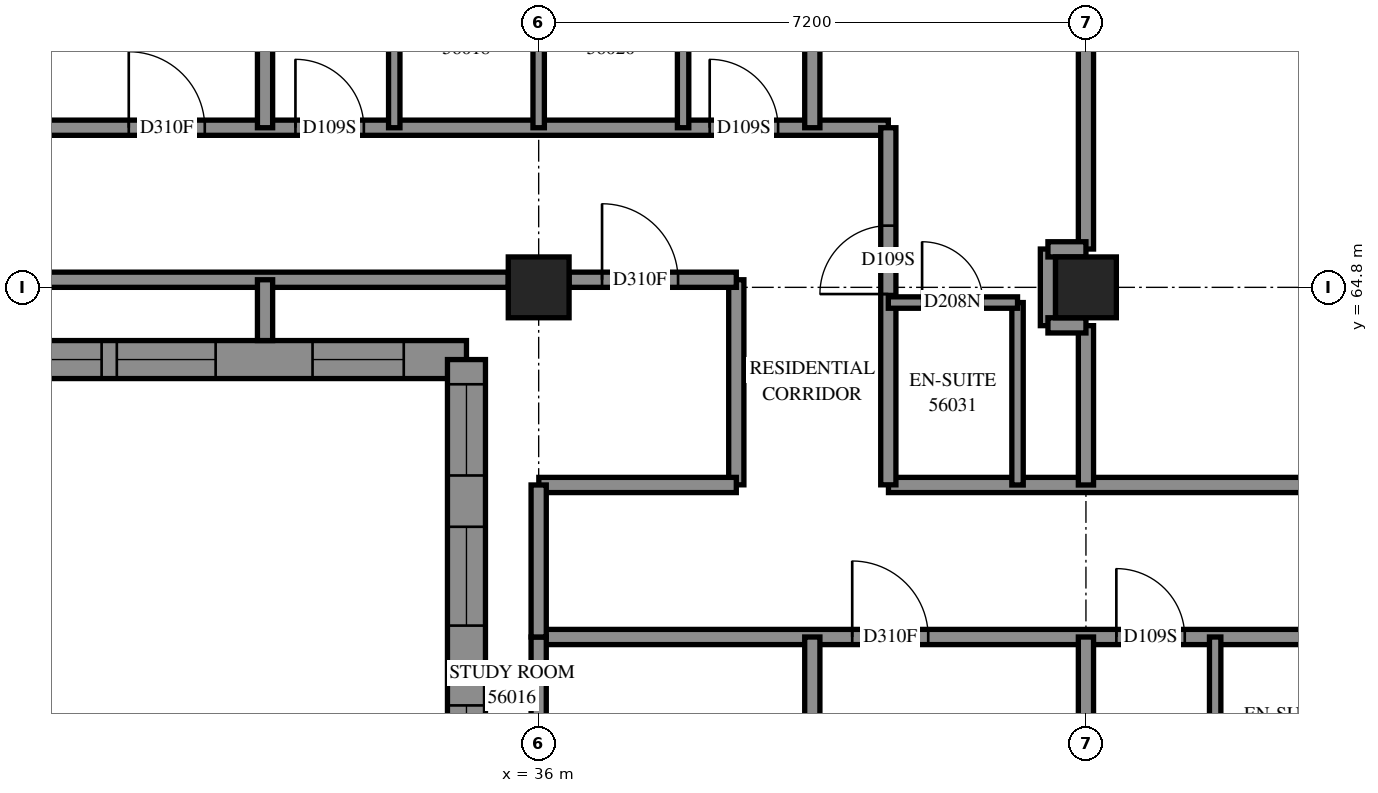
"""IFC4 building model, lengths in metres.
Left out: names, types, materials, properties, quantities, classifications, styles, units other than length and angle.
Written with IfcOpenShell. Run it as: python <this file> out.ifc"""

import sys

from ifc_helpers import new_model, si_unit, direction, frame, frame_2d, origin, origin_2d, place, context, subcontext, project, spatial, polyline, rectangle, outline, extrude, element, fill, save


model = new_model("IFC4")
c1 = context("Model", 3, precision=1e-05, world=origin(), true_north=direction((0.0, 1.0)))
c2 = subcontext(c1, "Body", "Model", "MODEL_VIEW")
j1 = project(units=[si_unit("LENGTHUNIT", "METRE"), si_unit("PLANEANGLEUNIT", "RADIAN")], contexts=[c1])
p1 = place(None, origin())
s1 = spatial("IfcSite", under=j1, at=p1, CompositionType="ELEMENT")
p2 = place(p1, origin())
s2 = spatial("IfcBuilding", under=s1, at=p2, CompositionType="ELEMENT")
p3 = place(p2, frame((0.0, 0.0, 206.6)))
s3 = spatial("IfcBuildingStorey", under=s2, at=p3, CompositionType="ELEMENT", Elevation=206.6)
for number, where, z_axis, x_axis in (
    (1, (36.0, 64.8, 0.0), (0.0, 0.0, 1.0), (1.0, 0.0, 0.0)),
    (2, (43.2, 64.8, 0.0), (0.0, 0.0, 1.0), (1.0, 0.0, 0.0)),
):
    element("IfcColumn", number, at=place(p3, frame(where, z_axis=z_axis, x_axis=x_axis)), inside=s3, PredefinedType="COLUMN", context=c2, shape_type="SweptSolid", body=[
        extrude(rectangle(XDim=0.8, YDim=0.8, at=origin_2d()), origin(), (0.0, 0.0, 1.0), 3.1),
    ])
p4 = place(p3, frame((26.799, 63.85, 0.0), z_axis=(0.0, 0.0, 1.0), x_axis=(1.0, 0.0, 0.0)))
e3 = element("IfcWall", 3, at=p4, inside=s3, PredefinedType="SOLIDWALL", context=c2, shape_type="SweptSolid", body=[
    extrude(outline(polyline([(-0.25, -0.25), (8.001, -0.25), (8.501, 0.25), (0.25, 0.25), (-0.25, -0.25)])), origin(), (0.0, 0.0, 1.0), 3.1),
])
p5 = place(p4, frame((2.151, 0.0, 0.45)))
e4 = element("IfcOpeningElement", 4, at=p5, cuts=e3, PredefinedType="OPENING", context=c2, shape_type="SweptSolid", body=[
    extrude(rectangle(XDim=1.3, YDim=2.5, at=frame_2d((0.65, 1.25))), frame((0.0, 0.26, 0.0), z_axis=(0.0, -1.0, 0.0), x_axis=(1.0, 0.0, 0.0)), (0.0, 0.0, 1.0), 0.52),
])
p6 = place(p4, frame((3.651, 0.0, 0.45)))
e5 = element("IfcOpeningElement", 5, at=p6, cuts=e3, PredefinedType="OPENING", context=c2, shape_type="SweptSolid", body=[
    extrude(rectangle(XDim=1.3, YDim=2.5, at=frame_2d((0.65, 1.25))), frame((0.0, 0.26, 0.0), z_axis=(0.0, -1.0, 0.0), x_axis=(1.0, 0.0, 0.0)), (0.0, 0.0, 1.0), 0.52),
])
p7 = place(p4, frame((0.625, 0.0, 0.45)))
e6 = element("IfcOpeningElement", 6, at=p7, cuts=e3, PredefinedType="OPENING", context=c2, shape_type="SweptSolid", body=[
    extrude(rectangle(XDim=1.2, YDim=2.5, at=frame_2d((0.6, 1.25))), frame((0.0, 0.26, 0.0), z_axis=(0.0, -1.0, 0.0), x_axis=(1.0, 0.0, 0.0)), (0.0, 0.0, 1.0), 0.52),
])
p8 = place(p4, frame((6.226, 0.0, 0.45)))
e7 = element("IfcOpeningElement", 7, at=p8, cuts=e3, PredefinedType="OPENING", context=c2, shape_type="SweptSolid", body=[
    extrude(rectangle(XDim=1.2, YDim=2.5, at=frame_2d((0.6, 1.25))), frame((0.0, 0.26, 0.0), z_axis=(0.0, -1.0, 0.0), x_axis=(1.0, 0.0, 0.0)), (0.0, 0.0, 1.0), 0.52),
])
p9 = place(p3, frame((35.05, 63.85, 0.0), z_axis=(0.0, 0.0, 1.0), x_axis=(0.0, -1.0, 0.0)))
e8 = element("IfcWall", 8, at=p9, inside=s3, PredefinedType="SOLIDWALL", context=c2, shape_type="SweptSolid", body=[
    extrude(outline(polyline([(0.25, -0.25), (7.45, -0.25), (6.95, 0.25), (-0.25, 0.25), (0.25, -0.25)])), origin(), (0.0, 0.0, 1.0), 3.1),
])
p10 = place(p9, frame((2.2, 0.0, 0.45)))
e9 = element("IfcOpeningElement", 9, at=p10, cuts=e8, PredefinedType="OPENING", context=c2, shape_type="SweptSolid", body=[
    extrude(rectangle(XDim=1.3, YDim=2.5, at=frame_2d((0.65, 1.25))), frame((0.0, 0.26, 0.0), z_axis=(0.0, -1.0, 0.0), x_axis=(1.0, 0.0, 0.0)), (0.0, 0.0, 1.0), 0.52),
])
p11 = place(p9, frame((4.55, 0.0, 0.45)))
e10 = element("IfcOpeningElement", 10, at=p11, cuts=e8, PredefinedType="OPENING", context=c2, shape_type="SweptSolid", body=[
    extrude(rectangle(XDim=1.3, YDim=2.5, at=frame_2d((0.65, 1.25))), frame((0.0, 0.26, 0.0), z_axis=(0.0, -1.0, 0.0), x_axis=(1.0, 0.0, 0.0)), (0.0, 0.0, 1.0), 0.52),
])
p12 = place(p9, frame((0.325, 0.0, 0.45)))
e11 = element("IfcOpeningElement", 11, at=p12, cuts=e8, PredefinedType="OPENING", context=c2, shape_type="SweptSolid", body=[
    extrude(rectangle(XDim=1.2, YDim=2.5, at=frame_2d((0.6, 1.25))), frame((0.0, 0.26, 0.0), z_axis=(0.0, -1.0, 0.0), x_axis=(1.0, 0.0, 0.0)), (0.0, 0.0, 1.0), 0.52),
])
p13 = place(p3, frame((36.0, 60.2, 0.0), z_axis=(0.0, 0.0, 1.0), x_axis=(1.0, 0.0, 0.0)))
e12 = element("IfcWall", 12, at=p13, inside=s3, PredefinedType="PARTITIONING", context=c2, shape_type="SweptSolid", body=[
    extrude(rectangle(XDim=17.0, YDim=0.2, at=frame_2d((8.5, 0.0))), origin(), (0.0, 0.0, 1.0), 3.1),
])
p14 = place(p13, frame((4.125, 0.0, 0.0)))
e13 = element("IfcOpeningElement", 13, at=p14, cuts=e12, PredefinedType="OPENING", context=c2, shape_type="SweptSolid", body=[
    extrude(rectangle(XDim=1.0, YDim=2.1, at=frame_2d((0.5, 1.05))), frame((0.0, 0.11, 0.0), z_axis=(0.0, -1.0, 0.0), x_axis=(1.0, 0.0, 0.0)), (0.0, 0.0, 1.0), 0.22),
])
p15 = place(p13, frame((7.6, 0.0, 0.0)))
e14 = element("IfcOpeningElement", 14, at=p15, cuts=e12, PredefinedType="OPENING", context=c2, shape_type="SweptSolid", body=[
    extrude(rectangle(XDim=0.9, YDim=2.1, at=frame_2d((0.45, 1.05))), frame((0.0, 0.11, 0.0), z_axis=(0.0, -1.0, 0.0), x_axis=(1.0, 0.0, 0.0)), (0.0, 0.0, 1.0), 0.22),
])
p16 = place(p13, frame((11.48, 0.0, 0.0)))
e15 = element("IfcOpeningElement", 15, at=p16, cuts=e12, PredefinedType="OPENING", context=c2, shape_type="SweptSolid", body=[
    extrude(rectangle(XDim=1.0, YDim=2.1, at=frame_2d((0.5, 1.05))), frame((0.0, 0.11, 0.0), z_axis=(0.0, -1.0, 0.0), x_axis=(1.0, 0.0, 0.0)), (0.0, 0.0, 1.0), 0.22),
])
p17 = place(p13, frame((15.805, 0.0, 0.0)))
e16 = element("IfcOpeningElement", 16, at=p17, cuts=e12, PredefinedType="OPENING", context=c2, shape_type="SweptSolid", body=[
    extrude(rectangle(XDim=1.0, YDim=2.1, at=frame_2d((0.5, 1.05))), frame((0.0, 0.11, 0.0), z_axis=(0.0, -1.0, 0.0), x_axis=(1.0, 0.0, 0.0)), (0.0, 0.0, 1.0), 0.22),
])
p18 = place(p3, frame((40.602, 62.2, 0.0), z_axis=(0.0, 0.0, 1.0), x_axis=(1.0, 0.0, 0.0)))
e17 = element("IfcWall", 17, at=p18, inside=s3, PredefinedType="PARTITIONING", context=c2, shape_type="SweptSolid", body=[
    extrude(rectangle(XDim=14.998, YDim=0.2, at=frame_2d((7.499, 0.0))), origin(), (0.0, 0.0, 1.0), 3.1),
])
p19 = place(p18, frame((6.308, 0.0, 0.0)))
e18 = element("IfcOpeningElement", 18, at=p19, cuts=e17, PredefinedType="OPENING", context=c2, shape_type="SweptSolid", body=[
    extrude(rectangle(XDim=1.0, YDim=2.1, at=frame_2d((0.5, 1.05))), frame((0.0, 0.11, 0.0), z_axis=(0.0, -1.0, 0.0), x_axis=(1.0, 0.0, 0.0)), (0.0, 0.0, 1.0), 0.22),
])
p20 = place(p18, frame((9.928, 0.0, 0.0)))
e19 = element("IfcOpeningElement", 19, at=p20, cuts=e17, PredefinedType="OPENING", context=c2, shape_type="SweptSolid", body=[
    extrude(rectangle(XDim=0.9, YDim=2.1, at=frame_2d((0.45, 1.05))), frame((0.0, 0.11, 0.0), z_axis=(0.0, -1.0, 0.0), x_axis=(1.0, 0.0, 0.0)), (0.0, 0.0, 1.0), 0.22),
])
p21 = place(p18, frame((13.746, 0.0, 0.0)))
e20 = element("IfcOpeningElement", 20, at=p21, cuts=e17, PredefinedType="OPENING", context=c2, shape_type="SweptSolid", body=[
    extrude(rectangle(XDim=1.0, YDim=2.1, at=frame_2d((0.5, 1.05))), frame((0.0, 0.11, 0.0), z_axis=(0.0, -1.0, 0.0), x_axis=(1.0, 0.0, 0.0)), (0.0, 0.0, 1.0), 0.22),
])
p22 = place(p3, frame((28.802, 66.9, 0.0), z_axis=(0.0, 0.0, 1.0), x_axis=(1.0, 0.0, 0.0)))
e21 = element("IfcWall", 21, at=p22, inside=s3, PredefinedType="PARTITIONING", context=c2, shape_type="SweptSolid", body=[
    extrude(rectangle(XDim=11.798, YDim=0.2, at=frame_2d((5.899, 0.0))), origin(), (0.0, 0.0, 1.0), 3.1),
])
p23 = place(p22, frame((1.805, 0.0, 0.0)))
e22 = element("IfcOpeningElement", 22, at=p23, cuts=e21, PredefinedType="OPENING", context=c2, shape_type="SweptSolid", body=[
    extrude(rectangle(XDim=1.0, YDim=2.1, at=frame_2d((0.5, 1.05))), frame((0.0, 0.11, 0.0), z_axis=(0.0, -1.0, 0.0), x_axis=(1.0, 0.0, 0.0)), (0.0, 0.0, 1.0), 0.22),
])
p24 = place(p22, frame((3.998, 0.0, 0.0)))
e23 = element("IfcOpeningElement", 23, at=p24, cuts=e21, PredefinedType="OPENING", context=c2, shape_type="SweptSolid", body=[
    extrude(rectangle(XDim=0.9, YDim=2.1, at=frame_2d((0.45, 1.05))), frame((0.0, 0.11, 0.0), z_axis=(0.0, -1.0, 0.0), x_axis=(1.0, 0.0, 0.0)), (0.0, 0.0, 1.0), 0.22),
])
p25 = place(p22, frame((9.448, 0.0, 0.0)))
e24 = element("IfcOpeningElement", 24, at=p25, cuts=e21, PredefinedType="OPENING", context=c2, shape_type="SweptSolid", body=[
    extrude(rectangle(XDim=0.9, YDim=2.1, at=frame_2d((0.45, 1.05))), frame((0.0, 0.11, 0.0), z_axis=(0.0, -1.0, 0.0), x_axis=(1.0, 0.0, 0.0)), (0.0, 0.0, 1.0), 0.22),
])
p26 = place(p3, frame((29.2, 64.9, 0.0), z_axis=(0.0, 0.0, 1.0), x_axis=(1.0, 0.0, 0.0)))
e25 = element("IfcWall", 25, at=p26, inside=s3, PredefinedType="PARTITIONING", context=c2, shape_type="SweptSolid", body=[
    extrude(rectangle(XDim=6.4, YDim=0.2, at=frame_2d((3.2, 0.0))), origin(), (0.0, 0.0, 1.0), 2.6),
])
p27 = place(p3, frame((43.2, 65.304, 0.0), z_axis=(0.0, 0.0, 1.0), x_axis=(0.0, 1.0, 0.0)))
e26 = element("IfcWall", 26, at=p27, inside=s3, PredefinedType="PARTITIONING", context=c2, shape_type="SweptSolid", body=[
    extrude(rectangle(XDim=6.192, YDim=0.2, at=frame_2d((3.096, 0.0))), origin(), (0.0, 0.0, 1.0), 3.1),
])
p28 = place(p3, frame((32.4, 66.9, 0.0), z_axis=(0.0, 0.0, 1.0), x_axis=(0.0, 1.0, 0.0)))
e27 = element("IfcWall", 27, at=p28, inside=s3, PredefinedType="PARTITIONING", context=c2, shape_type="SweptSolid", body=[
    extrude(rectangle(XDim=6.035, YDim=0.2, at=frame_2d((3.018, 0.0))), origin(), (0.0, 0.0, 1.0), 3.1),
])
p29 = place(p3, frame((39.6, 66.9, 0.0), z_axis=(0.0, 0.0, 1.0), x_axis=(0.0, 1.0, 0.0)))
e28 = element("IfcWall", 28, at=p29, inside=s3, PredefinedType="PARTITIONING", context=c2, shape_type="SweptSolid", body=[
    extrude(rectangle(XDim=5.981, YDim=0.2, at=frame_2d((2.991, 0.0))), origin(), (0.0, 0.0, 1.0), 3.1),
])
p30 = place(p3, frame((40.6, 62.202, 0.0), z_axis=(0.0, 0.0, 1.0), x_axis=(0.0, 1.0, 0.0)))
e29 = element("IfcWall", 29, at=p30, inside=s3, PredefinedType="PARTITIONING", context=c2, shape_type="SweptSolid", body=[
    extrude(rectangle(XDim=4.698, YDim=0.2, at=frame_2d((2.349, 0.0))), origin(), (0.0, 0.0, 1.0), 3.1),
])
p31 = place(p30, frame((2.51, 0.0, 0.0)))
e30 = element("IfcOpeningElement", 30, at=p31, cuts=e29, PredefinedType="OPENING", context=c2, shape_type="SweptSolid", body=[
    extrude(rectangle(XDim=0.9, YDim=2.1, at=frame_2d((0.45, 1.05))), frame((0.0, 0.11, 0.0), z_axis=(0.0, -1.0, 0.0), x_axis=(1.0, 0.0, 0.0)), (0.0, 0.0, 1.0), 0.22),
])
p32 = place(p3, frame((39.6, 56.9, 0.0), z_axis=(0.0, 0.0, 1.0), x_axis=(0.0, 1.0, 0.0)))
e31 = element("IfcWall", 31, at=p32, inside=s3, PredefinedType="PARTITIONING", context=c2, shape_type="SweptSolid", body=[
    extrude(rectangle(XDim=3.3, YDim=0.2, at=frame_2d((1.65, 0.0))), origin(), (0.0, 0.0, 1.0), 3.1),
])
p33 = place(p3, frame((38.6, 62.202, 0.0), z_axis=(0.0, 0.0, 1.0), x_axis=(0.0, 1.0, 0.0)))
e32 = element("IfcWall", 32, at=p33, inside=s3, PredefinedType="PARTITIONING", context=c2, shape_type="SweptSolid", body=[
    extrude(rectangle(XDim=2.698, YDim=0.2, at=frame_2d((1.349, 0.0))), origin(), (0.0, 0.0, 1.0), 3.1),
])
p34 = place(p3, frame((36.002, 62.2, 0.0), z_axis=(0.0, 0.0, 1.0), x_axis=(1.0, 0.0, 0.0)))
e33 = element("IfcWall", 33, at=p34, inside=s3, PredefinedType="PARTITIONING", context=c2, shape_type="SweptSolid", body=[
    extrude(rectangle(XDim=2.598, YDim=0.2, at=frame_2d((1.299, 0.0))), origin(), (0.0, 0.0, 1.0), 3.1),
])
for number, where, z_axis, x_axis in (
    (34, (44.9, 57.8, 0.0), (0.0, 0.0, 1.0), (0.0, 1.0, 0.0)),
    (35, (34.1, 66.9, 0.0), (0.0, 0.0, 1.0), (0.0, 1.0, 0.0)),
    (36, (36.0, 66.9, 0.0), (0.0, 0.0, 1.0), (0.0, 1.0, 0.0)),
    (37, (37.9, 66.9, 0.0), (0.0, 0.0, 1.0), (0.0, 1.0, 0.0)),
    (38, (42.3, 62.2, 0.0), (0.0, 0.0, 1.0), (0.0, 1.0, 0.0)),
):
    element("IfcWall", number, at=place(p3, frame(where, z_axis=z_axis, x_axis=x_axis)), inside=s3, PredefinedType="PARTITIONING", context=c2, shape_type="SweptSolid", body=[
        extrude(rectangle(XDim=2.4, YDim=0.15, at=frame_2d((1.2, 0.0))), origin(), (0.0, 0.0, 1.0), 3.1),
    ])
p35 = place(p3, frame((36.4, 64.9, 0.0), z_axis=(0.0, 0.0, 1.0), x_axis=(1.0, 0.0, 0.0)))
e39 = element("IfcWall", 39, at=p35, inside=s3, PredefinedType="PARTITIONING", context=c2, shape_type="SweptSolid", body=[
    extrude(rectangle(XDim=2.2, YDim=0.2, at=frame_2d((1.1, 0.0))), origin(), (0.0, 0.0, 1.0), 3.1),
])
p36 = place(p35, frame((0.434, 0.0, 0.0)))
e40 = element("IfcOpeningElement", 40, at=p36, cuts=e39, PredefinedType="OPENING", context=c2, shape_type="SweptSolid", body=[
    extrude(rectangle(XDim=1.0, YDim=2.1, at=frame_2d((0.5, 1.05))), frame((0.0, 0.11, 0.0), z_axis=(0.0, -1.0, 0.0), x_axis=(1.0, 0.0, 0.0)), (0.0, 0.0, 1.0), 0.22),
])
p37 = place(p3, frame((36.0, 58.0, 0.0), z_axis=(0.0, 0.0, 1.0), x_axis=(0.0, 1.0, 0.0)))
e41 = element("IfcWall", 41, at=p37, inside=s3, PredefinedType="PARTITIONING", context=c2, shape_type="SweptSolid", body=[
    extrude(rectangle(XDim=2.2, YDim=0.2, at=frame_2d((1.1, 0.0))), origin(), (0.0, 0.0, 1.0), 2.6),
])
p38 = place(p3, frame((43.2, 58.0, 0.0), z_axis=(0.0, 0.0, 1.0), x_axis=(0.0, 1.0, 0.0)))
e42 = element("IfcWall", 42, at=p38, inside=s3, PredefinedType="PARTITIONING", context=c2, shape_type="SweptSolid", body=[
    extrude(rectangle(XDim=2.2, YDim=0.2, at=frame_2d((1.1, 0.0))), origin(), (0.0, 0.0, 1.0), 3.1),
])
p39 = place(p3, frame((43.2, 62.2, 0.0), z_axis=(0.0, 0.0, 1.0), x_axis=(0.0, 1.0, 0.0)))
e43 = element("IfcWall", 43, at=p39, inside=s3, PredefinedType="PARTITIONING", context=c2, shape_type="SweptSolid", body=[
    extrude(rectangle(XDim=2.096, YDim=0.2, at=frame_2d((1.048, 0.0))), origin(), (0.0, 0.0, 1.0), 3.1),
])
p40 = place(p3, frame((36.0, 60.2, 0.0), z_axis=(0.0, 0.0, 1.0), x_axis=(0.0, 1.0, 0.0)))
e44 = element("IfcWall", 44, at=p40, inside=s3, PredefinedType="PARTITIONING", context=c2, shape_type="SweptSolid", body=[
    extrude(rectangle(XDim=2.0, YDim=0.2, at=frame_2d((1.0, 0.0))), origin(), (0.0, 0.0, 1.0), 2.6),
])
p41 = place(p3, frame((40.6, 64.6, 0.0), z_axis=(0.0, 0.0, 1.0), x_axis=(1.0, 0.0, 0.0)))
e45 = element("IfcWall", 45, at=p41, inside=s3, PredefinedType="PARTITIONING", context=c2, shape_type="SweptSolid", body=[
    extrude(rectangle(XDim=1.7, YDim=0.15, at=frame_2d((0.85, 0.0))), origin(), (0.0, 0.0, 1.0), 3.1),
])
p42 = place(p41, frame((0.444, 0.0, 0.0)))
e46 = element("IfcOpeningElement", 46, at=p42, cuts=e45, PredefinedType="OPENING", context=c2, shape_type="SweptSolid", body=[
    extrude(rectangle(XDim=0.8, YDim=2.1, at=frame_2d((0.4, 1.05))), frame((0.0, 0.085, 0.0), z_axis=(0.0, -1.0, 0.0), x_axis=(1.0, 0.0, 0.0)), (0.0, 0.0, 1.0), 0.17),
])
p43 = place(p3, frame((42.7, 64.296, 0.0), z_axis=(0.0, 0.0, 1.0), x_axis=(0.0, 1.0, 0.0)))
e47 = element("IfcWall", 47, at=p43, inside=s3, PredefinedType="PARTITIONING", context=c2, shape_type="SweptSolid", body=[
    extrude(rectangle(XDim=1.008, YDim=0.2, at=frame_2d((0.504, 0.0))), origin(), (0.0, 0.0, 1.0), 3.1),
])
p44 = place(p3, frame((32.4, 64.1, 0.0), z_axis=(0.0, 0.0, 1.0), x_axis=(0.0, 1.0, 0.0)))
e48 = element("IfcWall", 48, at=p44, inside=s3, PredefinedType="PARTITIONING", context=c2, shape_type="SweptSolid", body=[
    extrude(rectangle(XDim=0.8, YDim=0.2, at=frame_2d((0.4, 0.0))), origin(), (0.0, 0.0, 1.0), 3.1),
])
for number, where, z_axis, x_axis in (
    (49, (42.7, 65.3, 0.0), (0.0, 0.0, 1.0), (1.0, 0.0, 0.0)),
    (50, (42.7, 64.3, 0.0), (0.0, 0.0, 1.0), (1.0, 0.0, 0.0)),
):
    element("IfcWall", number, at=place(p3, frame(where, z_axis=z_axis, x_axis=x_axis)), inside=s3, PredefinedType="PARTITIONING", context=c2, shape_type="SweptSolid", body=[
        extrude(rectangle(XDim=0.5, YDim=0.2, at=frame_2d((0.25, 0.0))), origin(), (0.0, 0.0, 1.0), 3.1),
    ])
p45 = place(p5, origin())
e51 = element("IfcWindow", 51, at=p45, inside=s3, PartitioningType="SINGLE_PANEL", PredefinedType="WINDOW", context=c2, shape_type="SweptSolid", body=[
    extrude(rectangle(XDim=1.3, YDim=2.5, at=frame_2d((0.65, 1.25))), frame((0.0, 0.18, 0.0), z_axis=(0.0, -1.0, 0.0), x_axis=(1.0, 0.0, 0.0)), (0.0, 0.0, 1.0), 0.06),
])
fill(e4, e51)
p46 = place(p6, origin())
e52 = element("IfcWindow", 52, at=p46, inside=s3, PartitioningType="SINGLE_PANEL", PredefinedType="WINDOW", context=c2, shape_type="SweptSolid", body=[
    extrude(rectangle(XDim=1.3, YDim=2.5, at=frame_2d((0.65, 1.25))), frame((0.0, 0.18, 0.0), z_axis=(0.0, -1.0, 0.0), x_axis=(1.0, 0.0, 0.0)), (0.0, 0.0, 1.0), 0.06),
])
fill(e5, e52)
p47 = place(p8, origin())
e53 = element("IfcWindow", 53, at=p47, inside=s3, PartitioningType="SINGLE_PANEL", PredefinedType="WINDOW", context=c2, shape_type="SweptSolid", body=[
    extrude(rectangle(XDim=1.2, YDim=2.5, at=frame_2d((0.6, 1.25))), frame((0.0, 0.18, 0.0), z_axis=(0.0, -1.0, 0.0), x_axis=(1.0, 0.0, 0.0)), (0.0, 0.0, 1.0), 0.06),
])
fill(e7, e53)
p48 = place(p10, origin())
e54 = element("IfcWindow", 54, at=p48, inside=s3, PartitioningType="SINGLE_PANEL", PredefinedType="WINDOW", context=c2, shape_type="SweptSolid", body=[
    extrude(rectangle(XDim=1.3, YDim=2.5, at=frame_2d((0.65, 1.25))), frame((0.0, 0.18, 0.0), z_axis=(0.0, -1.0, 0.0), x_axis=(1.0, 0.0, 0.0)), (0.0, 0.0, 1.0), 0.06),
])
fill(e9, e54)
p49 = place(p11, origin())
e55 = element("IfcWindow", 55, at=p49, inside=s3, PartitioningType="SINGLE_PANEL", PredefinedType="WINDOW", context=c2, shape_type="SweptSolid", body=[
    extrude(rectangle(XDim=1.3, YDim=2.5, at=frame_2d((0.65, 1.25))), frame((0.0, 0.18, 0.0), z_axis=(0.0, -1.0, 0.0), x_axis=(1.0, 0.0, 0.0)), (0.0, 0.0, 1.0), 0.06),
])
fill(e10, e55)
p50 = place(p12, origin())
e56 = element("IfcWindow", 56, at=p50, inside=s3, PartitioningType="SINGLE_PANEL", PredefinedType="WINDOW", context=c2, shape_type="SweptSolid", body=[
    extrude(rectangle(XDim=1.2, YDim=2.5, at=frame_2d((0.6, 1.25))), frame((0.0, 0.18, 0.0), z_axis=(0.0, -1.0, 0.0), x_axis=(1.0, 0.0, 0.0)), (0.0, 0.0, 1.0), 0.06),
])
fill(e11, e56)
p51 = place(p23, origin())
e57 = element("IfcDoor", 57, at=p51, inside=s3, OperationType="SINGLE_SWING_RIGHT", PredefinedType="DOOR", context=c2, shape_type="SweptSolid", body=[
    extrude(rectangle(XDim=1.0, YDim=2.1, at=frame_2d((0.5, 1.05))), frame((0.0, 0.025, 0.0), z_axis=(0.0, -1.0, 0.0), x_axis=(1.0, 0.0, 0.0)), (0.0, 0.0, 1.0), 0.05),
])
fill(e22, e57)
p52 = place(p36, origin())
e58 = element("IfcDoor", 58, at=p52, inside=s3, OperationType="SINGLE_SWING_RIGHT", PredefinedType="DOOR", context=c2, shape_type="SweptSolid", body=[
    extrude(rectangle(XDim=1.0, YDim=2.1, at=frame_2d((0.5, 1.05))), frame((0.0, 0.025, 0.0), z_axis=(0.0, -1.0, 0.0), x_axis=(1.0, 0.0, 0.0)), (0.0, 0.0, 1.0), 0.05),
])
fill(e40, e58)
p53 = place(p24, origin())
e59 = element("IfcDoor", 59, at=p53, inside=s3, OperationType="SINGLE_SWING_LEFT", PredefinedType="DOOR", context=c2, shape_type="SweptSolid", body=[
    extrude(rectangle(XDim=0.9, YDim=2.1, at=frame_2d((0.45, 1.05))), frame((0.0, 0.025, 0.0), z_axis=(0.0, -1.0, 0.0), x_axis=(1.0, 0.0, 0.0)), (0.0, 0.0, 1.0), 0.05),
])
fill(e23, e59)
p54 = place(p25, origin())
e60 = element("IfcDoor", 60, at=p54, inside=s3, OperationType="SINGLE_SWING_RIGHT", PredefinedType="DOOR", context=c2, shape_type="SweptSolid", body=[
    extrude(rectangle(XDim=0.9, YDim=2.1, at=frame_2d((0.45, 1.05))), frame((0.0, 0.025, 0.0), z_axis=(0.0, -1.0, 0.0), x_axis=(1.0, 0.0, 0.0)), (0.0, 0.0, 1.0), 0.05),
])
fill(e24, e60)
p55 = place(p14, origin())
e61 = element("IfcDoor", 61, at=p55, inside=s3, OperationType="SINGLE_SWING_RIGHT", PredefinedType="DOOR", context=c2, shape_type="SweptSolid", body=[
    extrude(rectangle(XDim=1.0, YDim=2.1, at=frame_2d((0.5, 1.05))), frame((0.0, 0.025, 0.0), z_axis=(0.0, -1.0, 0.0), x_axis=(1.0, 0.0, 0.0)), (0.0, 0.0, 1.0), 0.05),
])
fill(e13, e61)
p56 = place(p15, origin())
e62 = element("IfcDoor", 62, at=p56, inside=s3, OperationType="SINGLE_SWING_LEFT", PredefinedType="DOOR", context=c2, shape_type="SweptSolid", body=[
    extrude(rectangle(XDim=0.9, YDim=2.1, at=frame_2d((0.45, 1.05))), frame((0.0, 0.025, 0.0), z_axis=(0.0, -1.0, 0.0), x_axis=(1.0, 0.0, 0.0)), (0.0, 0.0, 1.0), 0.05),
])
fill(e14, e62)
p57 = place(p31, origin())
e63 = element("IfcDoor", 63, at=p57, inside=s3, OperationType="SINGLE_SWING_LEFT", PredefinedType="DOOR", context=c2, shape_type="SweptSolid", body=[
    extrude(rectangle(XDim=0.9, YDim=2.1, at=frame_2d((0.45, 1.05))), frame((0.0, 0.025, 0.0), z_axis=(0.0, -1.0, 0.0), x_axis=(1.0, 0.0, 0.0)), (0.0, 0.0, 1.0), 0.05),
])
fill(e30, e63)
p58 = place(p42, origin())
e64 = element("IfcDoor", 64, at=p58, inside=s3, OperationType="SINGLE_SWING_RIGHT", PredefinedType="DOOR", context=c2, shape_type="SweptSolid", body=[
    extrude(rectangle(XDim=0.8, YDim=2.1, at=frame_2d((0.4, 1.05))), frame((0.0, 0.025, 0.0), z_axis=(0.0, -1.0, 0.0), x_axis=(1.0, 0.0, 0.0)), (0.0, 0.0, 1.0), 0.05),
])
fill(e46, e64)
save(model, sys.argv[1])
